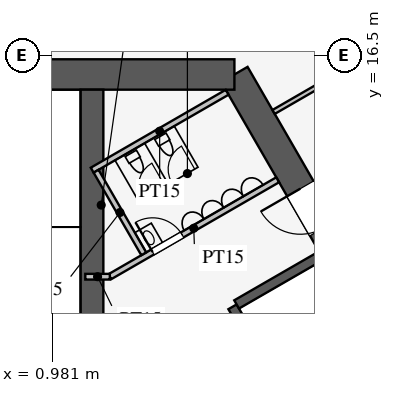
"""IFC4 building model, lengths in metres.
Left out: names, types, materials, properties, quantities, classifications, styles, units other than length and angle.
Written with IfcOpenShell. Run it as: python <this file> out.ifc"""

import sys

from ifc_helpers import new_model, si_unit, direction, frame, frame_2d, origin, place, context, subcontext, project, spatial, rectangle, extrude, element, fill, save


model = new_model("IFC4")
c1 = context("Model", 3, precision=1e-05, world=origin(), true_north=direction((0.0, 1.0)))
c2 = subcontext(c1, "Body", "Model", "MODEL_VIEW")
j1 = project(units=[si_unit("LENGTHUNIT", "METRE"), si_unit("PLANEANGLEUNIT", "RADIAN")], contexts=[c1])
p1 = place(None, origin())
s1 = spatial("IfcSite", under=j1, at=p1, CompositionType="ELEMENT")
p2 = place(p1, origin())
s2 = spatial("IfcBuilding", under=s1, at=p2, CompositionType="ELEMENT")
p3 = place(p2, frame((0.0, 0.0, 37.5)))
s3 = spatial("IfcBuildingStorey", under=s2, at=p3, CompositionType="ELEMENT", Elevation=37.5)
p4 = place(p3, frame((16.743, -3.0, 0.0), z_axis=(0.0, 0.0, 1.0), x_axis=(-0.500002442456, 0.866023993627, 0.0)))
e1 = element("IfcWall", 1, at=p4, inside=s3, PredefinedType="SHEAR", context=c2, shape_type="SweptSolid", body=[
    extrude(rectangle(XDim=21.939, YDim=0.8, at=frame_2d((10.97, 0.0))), origin(), (0.0, 0.0, 1.0), 4.2),
])
p5 = place(p4, frame((17.27, 0.0, 0.0)))
e2 = element("IfcOpeningElement", 2, at=p5, cuts=e1, PredefinedType="OPENING", context=c2, shape_type="SweptSolid", body=[
    extrude(rectangle(XDim=1.2, YDim=2.1, at=frame_2d((0.6, 1.05))), frame((0.0, 0.41, 0.0), z_axis=(0.0, -1.0, 0.0), x_axis=(1.0, 0.0, 0.0)), (0.0, 0.0, 1.0), 0.82),
])
p6 = place(p4, frame((3.47, 0.0, 0.0)))
e3 = element("IfcOpeningElement", 3, at=p6, cuts=e1, PredefinedType="OPENING", context=c2, shape_type="SweptSolid", body=[
    extrude(rectangle(XDim=1.2, YDim=2.1, at=frame_2d((0.6, 1.05))), frame((0.0, 0.41, 0.0), z_axis=(0.0, -1.0, 0.0), x_axis=(1.0, 0.0, 0.0)), (0.0, 0.0, 1.0), 0.82),
])
p7 = place(p3, frame((5.773, 16.0, 0.0), z_axis=(0.0, 0.0, 1.0), x_axis=(-1.0, 0.0, 0.0)))
e4 = element("IfcWall", 4, at=p7, inside=s3, PredefinedType="SHEAR", context=c2, shape_type="SweptSolid", body=[
    extrude(rectangle(XDim=11.547, YDim=0.8, at=frame_2d((5.773, 0.0))), origin(), (0.0, 0.0, 1.0), 4.2),
])
p8 = place(p3, frame((11.424, 0.014, 0.0), z_axis=(0.0, 0.0, 1.0), x_axis=(-0.500001763848, 0.866024385424, 0.0)))
e5 = element("IfcWall", 5, at=p8, inside=s3, PredefinedType="SHEAR", context=c2, shape_type="SweptSolid", body=[
    extrude(rectangle(XDim=11.4, YDim=0.25, at=frame_2d((5.7, 0.0))), origin(), (0.0, 0.0, 1.0), 4.2),
])
p9 = place(p3, frame((5.832, 9.949, 0.0), z_axis=(0.0, 0.0, 1.0), x_axis=(0.866029291668, 0.499993265928, 0.0)))
e6 = element("IfcWall", 6, at=p9, inside=s3, PredefinedType="SHEAR", context=c2, shape_type="SweptSolid", body=[
    extrude(rectangle(XDim=2.575, YDim=0.25, at=frame_2d((1.288, 0.0))), origin(), (0.0, 0.0, 1.0), 4.2),
])
p10 = place(p3, frame((2.025, 6.525, 0.0), z_axis=(0.0, 0.0, 1.0), x_axis=(0.0, 1.0, 0.0)))
e7 = element("IfcWall", 7, at=p10, inside=s3, PredefinedType="SHEAR", context=c2, shape_type="SweptSolid", body=[
    extrude(rectangle(XDim=9.075, YDim=0.6, at=frame_2d((4.538, 0.0))), origin(), (0.0, 0.0, 1.0), 4.2),
])
p11 = place(p3, frame((2.495, 10.678, 0.0), z_axis=(0.0, 0.0, 1.0), x_axis=(0.86602216432, 0.500005610874, 0.0)))
e8 = element("IfcWall", 8, at=p11, inside=s3, PredefinedType="PARTITIONING", context=c2, shape_type="SweptSolid", body=[
    extrude(rectangle(XDim=5.1, YDim=0.15, at=frame_2d((2.55, 0.0))), origin(), (0.0, 0.0, 1.0), 4.0),
])
p12 = place(p11, frame((1.3, 0.0, 0.0)))
e9 = element("IfcOpeningElement", 9, at=p12, cuts=e8, PredefinedType="OPENING", context=c2, shape_type="SweptSolid", body=[
    extrude(rectangle(XDim=0.9, YDim=2.1, at=frame_2d((0.45, 1.05))), frame((0.0, 0.085, 0.0), z_axis=(0.0, -1.0, 0.0), x_axis=(1.0, 0.0, 0.0)), (0.0, 0.0, 1.0), 0.17),
])
p13 = place(p3, frame((2.495, 10.678, 0.0), z_axis=(0.0, 0.0, 1.0), x_axis=(-1.0, 0.0, 0.0)))
e10 = element("IfcWall", 10, at=p13, inside=s3, PredefinedType="PARTITIONING", context=c2, shape_type="SweptSolid", body=[
    extrude(rectangle(XDim=0.645, YDim=0.15, at=frame_2d((0.323, 0.0))), origin(), (0.0, 0.0, 1.0), 4.0),
])
p14 = place(p3, frame((2.031, 13.482, 0.0), z_axis=(0.0, 0.0, 1.0), x_axis=(0.866050731258, 0.499956128963, 0.0)))
e11 = element("IfcWall", 11, at=p14, inside=s3, PredefinedType="PARTITIONING", context=c2, shape_type="SweptSolid", body=[
    extrude(rectangle(XDim=4.1, YDim=0.15, at=frame_2d((2.05, 0.0))), origin(), (0.0, 0.0, 1.0), 4.0),
])
p15 = place(p3, frame((3.389, 11.281, 0.0), z_axis=(0.0, 0.0, 1.0), x_axis=(-0.499989096993, 0.866031698547, 0.0)))
e12 = element("IfcWall", 12, at=p15, inside=s3, PredefinedType="PARTITIONING", context=c2, shape_type="SweptSolid", body=[
    extrude(rectangle(XDim=2.51, YDim=0.15, at=frame_2d((1.255, 0.0))), origin(), (0.0, 0.0, 1.0), 4.0),
])
p16 = place(p3, frame((6.805, 15.014, 0.0), z_axis=(0.0, 0.0, 1.0), x_axis=(0.866031096941, 0.499990139034, 0.0)))
e13 = element("IfcWall", 13, at=p16, inside=s3, PredefinedType="PARTITIONING", context=c2, shape_type="SweptSolid", body=[
    extrude(rectangle(XDim=4.5, YDim=0.12, at=frame_2d((2.25, 0.0))), origin(), (0.0, 0.0, 1.0), 2.9),
])
p17 = place(p12, origin())
e14 = element("IfcDoor", 14, at=p17, inside=s3, OperationType="SINGLE_SWING_LEFT", PredefinedType="DOOR", context=c2, shape_type="SweptSolid", body=[
    extrude(rectangle(XDim=0.9, YDim=2.1, at=frame_2d((0.45, 1.05))), frame((0.0, 0.025, 0.0), z_axis=(0.0, -1.0, 0.0), x_axis=(1.0, 0.0, 0.0)), (0.0, 0.0, 1.0), 0.05),
])
fill(e9, e14)
p18 = place(p5, origin())
e15 = element("IfcDoor", 15, at=p18, inside=s3, OperationType="SINGLE_SWING_RIGHT", PredefinedType="DOOR", context=c2, shape_type="SweptSolid", body=[
    extrude(rectangle(XDim=1.2, YDim=2.1, at=frame_2d((0.6, 1.05))), frame((0.0, 0.025, 0.0), z_axis=(0.0, -1.0, 0.0), x_axis=(1.0, 0.0, 0.0)), (0.0, 0.0, 1.0), 0.05),
])
fill(e2, e15)
save(model, sys.argv[1])
